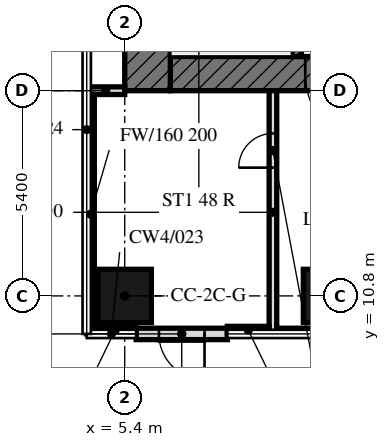
"""IFC4 building model, lengths in metres.
Left out: names, types, materials, properties, quantities, classifications, styles, units other than length and angle.
Written with IfcOpenShell. Run it as: python <this file> out.ifc"""

import sys

from ifc_helpers import new_model, si_unit, direction, frame, frame_2d, origin, origin_2d, place, context, subcontext, project, spatial, rectangle, extrude, element, fill, save


model = new_model("IFC4")
c1 = context("Model", 3, precision=1e-05, world=origin(), true_north=direction((0.0, 1.0)))
c2 = subcontext(c1, "Body", "Model", "MODEL_VIEW")
j1 = project(units=[si_unit("LENGTHUNIT", "METRE"), si_unit("PLANEANGLEUNIT", "RADIAN")], contexts=[c1])
p1 = place(None, origin())
s1 = spatial("IfcSite", under=j1, at=p1, CompositionType="ELEMENT")
p2 = place(p1, origin())
s2 = spatial("IfcBuilding", under=s1, at=p2, CompositionType="ELEMENT")
p3 = place(p2, origin())
s3 = spatial("IfcBuildingStorey", under=s2, at=p3, CompositionType="ELEMENT", Elevation=0.0)
for number, where, z_axis, x_axis in (
    (1, (5.4, 10.8, 0.0), (0.0, 0.0, 1.0), (1.0, 0.0, 0.0)),
    (2, (10.8, 10.8, 0.0), (0.0, 0.0, 1.0), (1.0, 0.0, 0.0)),
):
    element("IfcColumn", number, at=place(p3, frame(where, z_axis=z_axis, x_axis=x_axis)), inside=s3, PredefinedType="COLUMN", context=c2, shape_type="SweptSolid", body=[
        extrude(rectangle(XDim=1.4, YDim=1.4, at=origin_2d()), origin(), (0.0, 0.0, 1.0), 8.0),
    ])
p4 = place(p3, frame((8.1, 9.8, 0.0), z_axis=(0.0, 0.0, 1.0), x_axis=(-1.0, 0.0, 0.0)))
e3 = element("IfcWall", 3, at=p4, inside=s3, PredefinedType="SOLIDWALL", context=c2, shape_type="SweptSolid", body=[
    extrude(rectangle(XDim=2.4, YDim=0.3, at=frame_2d((1.2, 0.0))), origin(), (0.0, 0.0, 1.0), 8.0),
])
p5 = place(p4, frame((0.6, 0.0, 0.0)))
e4 = element("IfcOpeningElement", 4, at=p5, cuts=e3, PredefinedType="OPENING", context=c2, shape_type="SweptSolid", body=[
    extrude(rectangle(XDim=1.2, YDim=2.4, at=frame_2d((0.6, 1.2))), frame((0.0, 0.16, 0.0), z_axis=(0.0, -1.0, 0.0), x_axis=(1.0, 0.0, 0.0)), (0.0, 0.0, 1.0), 0.32),
])
p6 = place(p3, frame((17.7, 16.65, 0.0), z_axis=(0.0, 0.0, 1.0), x_axis=(-1.0, 0.0, 0.0)))
e5 = element("IfcWall", 5, at=p6, inside=s3, PredefinedType="SOLIDWALL", context=c2, shape_type="SweptSolid", body=[
    extrude(rectangle(XDim=11.1, YDim=0.9, at=frame_2d((5.55, 0.0))), origin(), (0.0, 0.0, 1.0), 8.0),
])
p7 = place(p6, frame((5.55, 0.0, 0.0)))
e6 = element("IfcOpeningElement", 6, at=p7, cuts=e5, PredefinedType="OPENING", context=c2, shape_type="SweptSolid", body=[
    extrude(rectangle(XDim=2.0, YDim=2.4, at=frame_2d((1.0, 1.2))), frame((0.0, 0.45, 0.0), z_axis=(0.0, -1.0, 0.0), x_axis=(1.0, 0.0, 0.0)), (0.0, 0.0, 1.0), 0.9),
])
p8 = place(p3, frame((6.0, 16.2, 0.0), z_axis=(0.0, 0.0, 1.0), x_axis=(0.0, 1.0, 0.0)))
e7 = element("IfcWall", 7, at=p8, inside=s3, PredefinedType="SOLIDWALL", context=c2, shape_type="SweptSolid", body=[
    extrude(rectangle(XDim=16.2, YDim=1.2, at=frame_2d((8.1, 0.0))), origin(), (0.0, 0.0, 1.0), 8.0),
])
p9 = place(p8, frame((5.55, 0.0, 0.0)))
e8 = element("IfcOpeningElement", 8, at=p9, cuts=e7, PredefinedType="OPENING", context=c2, shape_type="SweptSolid", body=[
    extrude(rectangle(XDim=1.2, YDim=2.1, at=frame_2d((0.6, 1.05))), frame((0.0, 0.6, 0.0), z_axis=(0.0, -1.0, 0.0), x_axis=(1.0, 0.0, 0.0)), (0.0, 0.0, 1.0), 1.2),
])
p10 = place(p3, frame((9.925, 17.1, 0.0), z_axis=(0.0, 0.0, 1.0), x_axis=(0.0, 1.0, 0.0)))
e9 = element("IfcWall", 9, at=p10, inside=s3, PredefinedType="SOLIDWALL", context=c2, shape_type="SweptSolid", body=[
    extrude(rectangle(XDim=14.4, YDim=0.25, at=frame_2d((7.2, 0.0))), origin(), (0.0, 0.0, 1.0), 8.0),
])
p11 = place(p10, frame((4.6, 0.0, 0.0)))
e10 = element("IfcOpeningElement", 10, at=p11, cuts=e9, PredefinedType="OPENING", context=c2, shape_type="SweptSolid", body=[
    extrude(rectangle(XDim=1.0, YDim=2.1, at=frame_2d((0.5, 1.05))), frame((0.0, 0.125, 0.0), z_axis=(0.0, -1.0, 0.0), x_axis=(1.0, 0.0, 0.0)), (0.0, 0.0, 1.0), 0.25),
])
p12 = place(p10, frame((7.062, 0.0, 0.0)))
e11 = element("IfcOpeningElement", 11, at=p12, cuts=e9, PredefinedType="OPENING", context=c2, shape_type="SweptSolid", body=[
    extrude(rectangle(XDim=1.2, YDim=2.1, at=frame_2d((0.6, 1.05))), frame((0.0, 0.125, 0.0), z_axis=(0.0, -1.0, 0.0), x_axis=(1.0, 0.0, 0.0)), (0.0, 0.0, 1.0), 0.25),
])
p13 = place(p10, frame((9.925, 0.0, 0.0)))
e12 = element("IfcOpeningElement", 12, at=p13, cuts=e9, PredefinedType="OPENING", context=c2, shape_type="SweptSolid", body=[
    extrude(rectangle(XDim=1.1, YDim=2.1, at=frame_2d((0.55, 1.05))), frame((0.0, 0.125, 0.0), z_axis=(0.0, -1.0, 0.0), x_axis=(1.0, 0.0, 0.0)), (0.0, 0.0, 1.0), 0.25),
])
p14 = place(p10, frame((12.587, 0.0, 0.0)))
e13 = element("IfcOpeningElement", 13, at=p14, cuts=e9, PredefinedType="OPENING", context=c2, shape_type="SweptSolid", body=[
    extrude(rectangle(XDim=1.1, YDim=2.1, at=frame_2d((0.55, 1.05))), frame((0.0, 0.125, 0.0), z_axis=(0.0, -1.0, 0.0), x_axis=(1.0, 0.0, 0.0)), (0.0, 0.0, 1.0), 0.25),
])
p15 = place(p3, frame((9.3, 9.8, 0.0), z_axis=(0.0, 0.0, 1.0), x_axis=(0.0, 1.0, 0.0)))
e14 = element("IfcWall", 14, at=p15, inside=s3, PredefinedType="PARTITIONING", context=c2, shape_type="SweptSolid", body=[
    extrude(rectangle(XDim=6.4, YDim=0.2, at=frame_2d((3.2, 0.0))), origin(), (0.0, 0.0, 1.0), 7.25),
])
p16 = place(p15, frame((4.375, 0.0, 0.0)))
e15 = element("IfcOpeningElement", 15, at=p16, cuts=e14, PredefinedType="OPENING", context=c2, shape_type="SweptSolid", body=[
    extrude(rectangle(XDim=0.9, YDim=2.1, at=frame_2d((0.45, 1.05))), frame((0.0, 0.1, 0.0), z_axis=(0.0, -1.0, 0.0), x_axis=(1.0, 0.0, 0.0)), (0.0, 0.0, 1.0), 0.2),
])
p17 = place(p3, frame((5.4, 16.2, 0.0), z_axis=(0.0, 0.0, 1.0), x_axis=(-1.0, 0.0, 0.0)))
e16 = element("IfcWall", 16, at=p17, inside=s3, PredefinedType="PARTITIONING", context=c2, shape_type="SweptSolid", body=[
    extrude(rectangle(XDim=1.0, YDim=0.2, at=frame_2d((0.5, 0.0))), origin(), (0.0, 0.0, 1.0), 7.25),
])
p18 = place(p3, frame((4.5, 16.1, 0.0), z_axis=(0.0, 0.0, 1.0), x_axis=(0.0, -1.0, 0.0)))
e17 = element("IfcWall", 17, at=p18, inside=s3, PredefinedType="PARTITIONING", context=c2, shape_type="SweptSolid", body=[
    extrude(rectangle(XDim=6.3, YDim=0.2, at=frame_2d((3.15, 0.0))), origin(), (0.0, 0.0, 1.0), 7.25),
])
for number, where, z_axis, x_axis in (
    (18, (4.6, 9.9, 0.0), (0.0, 0.0, 1.0), (1.0, 0.0, 0.0)),
    (19, (8.1, 9.9, 0.0), (0.0, 0.0, 1.0), (1.0, 0.0, 0.0)),
):
    element("IfcWall", number, at=place(p3, frame(where, z_axis=z_axis, x_axis=x_axis)), inside=s3, PredefinedType="PARTITIONING", context=c2, shape_type="SweptSolid", body=[
        extrude(rectangle(XDim=1.1, YDim=0.2, at=frame_2d((0.55, 0.0))), origin(), (0.0, 0.0, 1.0), 8.0),
    ])
p19 = place(p3, frame((9.4, 9.9, 0.0), z_axis=(0.0, 0.0, 1.0), x_axis=(1.0, 0.0, 0.0)))
e20 = element("IfcWall", 20, at=p19, inside=s3, PredefinedType="PARTITIONING", context=c2, shape_type="SweptSolid", body=[
    extrude(rectangle(XDim=12.2, YDim=0.1, at=frame_2d((6.1, 0.0))), origin(), (0.0, 0.0, 1.0), 7.25),
])
p20 = place(p5, origin())
e21 = element("IfcDoor", 21, at=p20, inside=s3, OperationType="SINGLE_SWING_LEFT", PredefinedType="DOOR", context=c2, shape_type="SweptSolid", body=[
    extrude(rectangle(XDim=1.2, YDim=2.4, at=frame_2d((0.6, 1.2))), frame((0.0, 0.025, 0.0), z_axis=(0.0, -1.0, 0.0), x_axis=(1.0, 0.0, 0.0)), (0.0, 0.0, 1.0), 0.05),
])
fill(e4, e21)
p21 = place(p7, origin())
e22 = element("IfcDoor", 22, at=p21, inside=s3, OperationType="DOUBLE_DOOR_SINGLE_SWING", PredefinedType="DOOR", context=c2, shape_type="SweptSolid", body=[
    extrude(rectangle(XDim=2.0, YDim=2.4, at=frame_2d((1.0, 1.2))), frame((0.0, 0.025, 0.0), z_axis=(0.0, -1.0, 0.0), x_axis=(1.0, 0.0, 0.0)), (0.0, 0.0, 1.0), 0.05),
])
fill(e6, e22)
p22 = place(p16, origin())
e23 = element("IfcDoor", 23, at=p22, inside=s3, OperationType="SINGLE_SWING_RIGHT", PredefinedType="DOOR", context=c2, shape_type="SweptSolid", body=[
    extrude(rectangle(XDim=0.9, YDim=2.1, at=frame_2d((0.45, 1.05))), frame((0.0, 0.025, 0.0), z_axis=(0.0, -1.0, 0.0), x_axis=(1.0, 0.0, 0.0)), (0.0, 0.0, 1.0), 0.05),
])
fill(e15, e23)
save(model, sys.argv[1])
